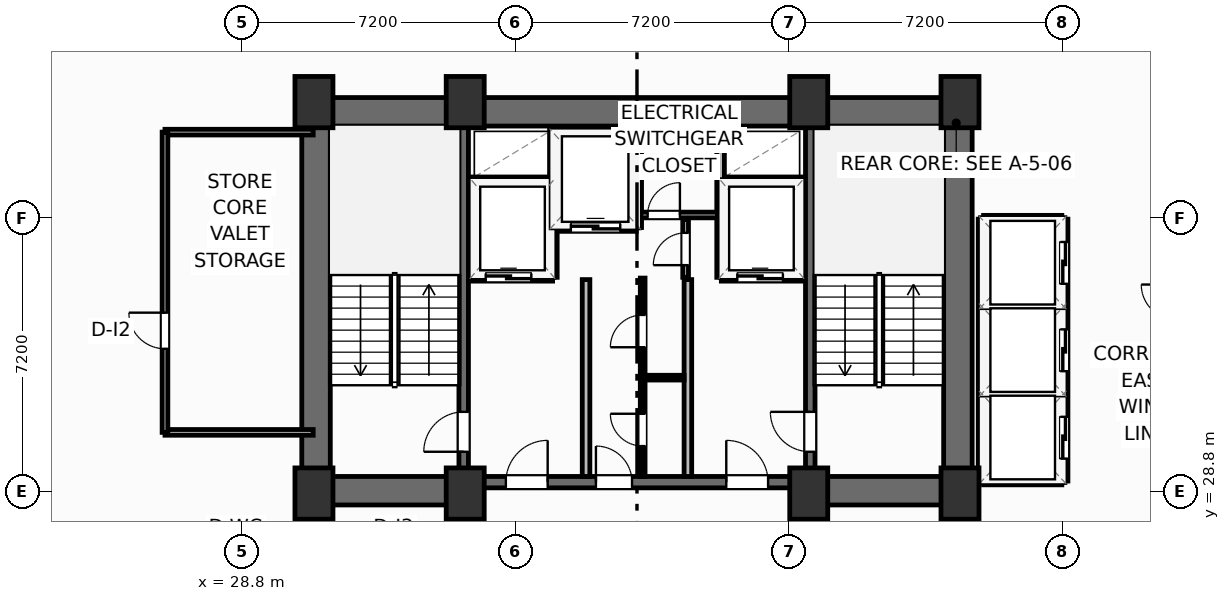
"""IFC4 building model, lengths in metres.
Left out: names, types, materials, properties, quantities, classifications, styles, units other than length and angle.
Written with IfcOpenShell. Run it as: python <this file> out.ifc"""

import sys

from ifc_helpers import new_model, si_unit, direction, frame, frame_2d, origin, origin_2d, place, context, subcontext, project, spatial, rectangle, extrude, element, fill, save


model = new_model("IFC4")
c1 = context("Model", 3, precision=1e-05, world=origin(), true_north=direction((0.0, 1.0)))
c2 = subcontext(c1, "Body", "Model", "MODEL_VIEW")
j1 = project(units=[si_unit("LENGTHUNIT", "METRE"), si_unit("PLANEANGLEUNIT", "RADIAN")], contexts=[c1])
p1 = place(None, origin())
s1 = spatial("IfcSite", under=j1, at=p1, CompositionType="ELEMENT")
p2 = place(p1, origin())
s2 = spatial("IfcBuilding", under=s1, at=p2, CompositionType="ELEMENT")
p3 = place(p2, frame((0.0, 0.0, 121.7)))
s3 = spatial("IfcBuildingStorey", under=s2, at=p3, CompositionType="ELEMENT", Elevation=121.7)
for number, where, z_axis, x_axis in (
    (1, (30.7, 28.75, 0.0), (0.0, 0.0, 1.0), (1.0, 0.0, 0.0)),
    (2, (34.68, 28.75, 0.0), (0.0, 0.0, 1.0), (1.0, 0.0, 0.0)),
    (3, (43.72, 28.75, 0.0), (0.0, 0.0, 1.0), (1.0, 0.0, 0.0)),
    (4, (47.7, 28.75, 0.0), (0.0, 0.0, 1.0), (1.0, 0.0, 0.0)),
    (5, (30.7, 39.05, 0.0), (0.0, 0.0, 1.0), (1.0, 0.0, 0.0)),
    (6, (34.68, 39.05, 0.0), (0.0, 0.0, 1.0), (1.0, 0.0, 0.0)),
    (7, (43.72, 39.05, 0.0), (0.0, 0.0, 1.0), (1.0, 0.0, 0.0)),
    (8, (47.7, 39.05, 0.0), (0.0, 0.0, 1.0), (1.0, 0.0, 0.0)),
):
    element("IfcColumn", number, at=place(p3, frame(where, z_axis=z_axis, x_axis=x_axis)), inside=s3, PredefinedType="COLUMN", context=c2, shape_type="SweptSolid", body=[
        extrude(rectangle(XDim=1.0, YDim=1.35, at=origin_2d()), origin(), (0.0, 0.0, 1.0), 3.7),
    ])
p4 = place(p3, frame((30.38, 38.795, 0.0), z_axis=(0.0, 0.0, 1.0), x_axis=(1.0, 0.0, 0.0)))
e9 = element("IfcWall", 9, at=p4, inside=s3, PredefinedType="SHEAR", context=c2, shape_type="SweptSolid", body=[
    extrude(rectangle(XDim=17.64, YDim=0.75, at=frame_2d((8.82, 0.0))), origin(), (0.0, 0.0, 1.0), 3.45),
])
for number, where, z_axis, x_axis in (
    (10, (30.755, 29.2, 0.0), (0.0, 0.0, 1.0), (0.0, 1.0, 0.0)),
    (11, (47.645, 29.2, 0.0), (0.0, 0.0, 1.0), (0.0, 1.0, 0.0)),
):
    element("IfcWall", number, at=place(p3, frame(where, z_axis=z_axis, x_axis=x_axis)), inside=s3, PredefinedType="SHEAR", context=c2, shape_type="SweptSolid", body=[
        extrude(rectangle(XDim=9.22, YDim=0.75, at=frame_2d((4.61, 0.0))), origin(), (0.0, 0.0, 1.0), 3.45),
    ])
p5 = place(p3, frame((30.38, 28.825, 0.0), z_axis=(0.0, 0.0, 1.0), x_axis=(1.0, 0.0, 0.0)))
e12 = element("IfcWall", 12, at=p5, inside=s3, PredefinedType="SHEAR", context=c2, shape_type="SweptSolid", body=[
    extrude(rectangle(XDim=4.42, YDim=0.75, at=frame_2d((2.21, 0.0))), origin(), (0.0, 0.0, 1.0), 3.45),
])
p6 = place(p3, frame((43.6, 28.825, 0.0), z_axis=(0.0, 0.0, 1.0), x_axis=(1.0, 0.0, 0.0)))
e13 = element("IfcWall", 13, at=p6, inside=s3, PredefinedType="SHEAR", context=c2, shape_type="SweptSolid", body=[
    extrude(rectangle(XDim=4.42, YDim=0.75, at=frame_2d((2.21, 0.0))), origin(), (0.0, 0.0, 1.0), 3.45),
])
p7 = place(p3, frame((34.8, 29.05, 0.0), z_axis=(0.0, 0.0, 1.0), x_axis=(1.0, 0.0, 0.0)))
e14 = element("IfcWall", 14, at=p7, inside=s3, PredefinedType="SHEAR", context=c2, shape_type="SweptSolid", body=[
    extrude(rectangle(XDim=8.8, YDim=0.3, at=frame_2d((4.4, 0.0))), origin(), (0.0, 0.0, 1.0), 3.45),
])
p8 = place(p7, frame((0.95, 0.0, 0.0)))
e15 = element("IfcOpeningElement", 15, at=p8, cuts=e14, PredefinedType="OPENING", context=c2, shape_type="SweptSolid", body=[
    extrude(rectangle(XDim=1.1, YDim=2.15, at=frame_2d((0.55, 1.075))), frame((0.0, 0.16, 0.0), z_axis=(0.0, -1.0, 0.0), x_axis=(1.0, 0.0, 0.0)), (0.0, 0.0, 1.0), 0.32),
])
p9 = place(p7, frame((6.75, 0.0, 0.0)))
e16 = element("IfcOpeningElement", 16, at=p9, cuts=e14, PredefinedType="OPENING", context=c2, shape_type="SweptSolid", body=[
    extrude(rectangle(XDim=1.1, YDim=2.15, at=frame_2d((0.55, 1.075))), frame((0.0, 0.16, 0.0), z_axis=(0.0, -1.0, 0.0), x_axis=(1.0, 0.0, 0.0)), (0.0, 0.0, 1.0), 0.32),
])
p10 = place(p7, frame((3.32, 0.0, 0.0)))
e17 = element("IfcOpeningElement", 17, at=p10, cuts=e14, PredefinedType="OPENING", context=c2, shape_type="SweptSolid", body=[
    extrude(rectangle(XDim=0.95, YDim=2.15, at=frame_2d((0.475, 1.075))), frame((0.0, 0.16, 0.0), z_axis=(0.0, -1.0, 0.0), x_axis=(1.0, 0.0, 0.0)), (0.0, 0.0, 1.0), 0.32),
])
p11 = place(p3, frame((34.64, 29.2, 0.0), z_axis=(0.0, 0.0, 1.0), x_axis=(0.0, 1.0, 0.0)))
e18 = element("IfcWall", 18, at=p11, inside=s3, PredefinedType="SHEAR", context=c2, shape_type="SweptSolid", body=[
    extrude(rectangle(XDim=9.22, YDim=0.25, at=frame_2d((4.61, 0.0))), origin(), (0.0, 0.0, 1.0), 3.45),
])
p12 = place(p11, frame((0.65, 0.0, 0.0)))
e19 = element("IfcOpeningElement", 19, at=p12, cuts=e18, PredefinedType="OPENING", context=c2, shape_type="SweptSolid", body=[
    extrude(rectangle(XDim=1.05, YDim=2.15, at=frame_2d((0.525, 1.075))), frame((0.0, 0.135, 0.0), z_axis=(0.0, -1.0, 0.0), x_axis=(1.0, 0.0, 0.0)), (0.0, 0.0, 1.0), 0.27),
])
p13 = place(p3, frame((43.76, 29.2, 0.0), z_axis=(0.0, 0.0, 1.0), x_axis=(0.0, 1.0, 0.0)))
e20 = element("IfcWall", 20, at=p13, inside=s3, PredefinedType="SHEAR", context=c2, shape_type="SweptSolid", body=[
    extrude(rectangle(XDim=9.22, YDim=0.25, at=frame_2d((4.61, 0.0))), origin(), (0.0, 0.0, 1.0), 3.45),
])
p14 = place(p13, frame((0.65, 0.0, 0.0)))
e21 = element("IfcOpeningElement", 21, at=p14, cuts=e20, PredefinedType="OPENING", context=c2, shape_type="SweptSolid", body=[
    extrude(rectangle(XDim=1.05, YDim=2.15, at=frame_2d((0.525, 1.075))), frame((0.0, 0.135, 0.0), z_axis=(0.0, -1.0, 0.0), x_axis=(1.0, 0.0, 0.0)), (0.0, 0.0, 1.0), 0.27),
])
for number, where, z_axis, x_axis in (
    (22, (37.86, 29.2, 0.0), (0.0, 0.0, 1.0), (0.0, 1.0, 0.0)),
    (23, (40.54, 29.2, 0.0), (0.0, 0.0, 1.0), (0.0, 1.0, 0.0)),
):
    element("IfcWall", number, at=place(p3, frame(where, z_axis=z_axis, x_axis=x_axis)), inside=s3, PredefinedType="PARTITIONING", context=c2, shape_type="SweptSolid", body=[
        extrude(rectangle(XDim=5.18, YDim=0.2, at=frame_2d((2.59, 0.0))), origin(), (0.0, 0.0, 1.0), 3.45),
    ])
p15 = place(p3, frame((34.8, 34.44, 0.0), z_axis=(0.0, 0.0, 1.0), x_axis=(1.0, 0.0, 0.0)))
e24 = element("IfcWall", 24, at=p15, inside=s3, PredefinedType="PARTITIONING", context=c2, shape_type="SweptSolid", body=[
    extrude(rectangle(XDim=2.18, YDim=0.2, at=frame_2d((1.09, 0.0))), origin(), (0.0, 0.0, 1.0), 3.45),
])
p16 = place(p15, frame((0.42, 0.0, 0.0)))
e25 = element("IfcOpeningElement", 25, at=p16, cuts=e24, PredefinedType="OPENING", context=c2, shape_type="SweptSolid", body=[
    extrude(rectangle(XDim=1.2, YDim=2.2, at=frame_2d((0.6, 1.1))), frame((0.0, 0.11, 0.0), z_axis=(0.0, -1.0, 0.0), x_axis=(1.0, 0.0, 0.0)), (0.0, 0.0, 1.0), 0.22),
])
p17 = place(p3, frame((34.8, 36.98, 0.0), z_axis=(0.0, 0.0, 1.0), x_axis=(1.0, 0.0, 0.0)))
e26 = element("IfcWall", 26, at=p17, inside=s3, PredefinedType="PARTITIONING", context=c2, shape_type="SweptSolid", body=[
    extrude(rectangle(XDim=2.18, YDim=0.2, at=frame_2d((1.09, 0.0))), origin(), (0.0, 0.0, 1.0), 3.45),
])
p18 = place(p3, frame((37.0, 34.44, 0.0), z_axis=(0.0, 0.0, 1.0), x_axis=(0.0, 1.0, 0.0)))
e27 = element("IfcWall", 27, at=p18, inside=s3, PredefinedType="PARTITIONING", context=c2, shape_type="SweptSolid", body=[
    extrude(rectangle(XDim=3.9, YDim=0.2, at=frame_2d((1.95, 0.0))), origin(), (0.0, 0.0, 1.0), 3.45),
])
p19 = place(p3, frame((41.42, 34.44, 0.0), z_axis=(0.0, 0.0, 1.0), x_axis=(1.0, 0.0, 0.0)))
e28 = element("IfcWall", 28, at=p19, inside=s3, PredefinedType="PARTITIONING", context=c2, shape_type="SweptSolid", body=[
    extrude(rectangle(XDim=2.18, YDim=0.2, at=frame_2d((1.09, 0.0))), origin(), (0.0, 0.0, 1.0), 3.45),
])
p20 = place(p19, frame((0.42, 0.0, 0.0)))
e29 = element("IfcOpeningElement", 29, at=p20, cuts=e28, PredefinedType="OPENING", context=c2, shape_type="SweptSolid", body=[
    extrude(rectangle(XDim=1.2, YDim=2.2, at=frame_2d((0.6, 1.1))), frame((0.0, 0.11, 0.0), z_axis=(0.0, -1.0, 0.0), x_axis=(1.0, 0.0, 0.0)), (0.0, 0.0, 1.0), 0.22),
])
p21 = place(p3, frame((41.42, 36.98, 0.0), z_axis=(0.0, 0.0, 1.0), x_axis=(1.0, 0.0, 0.0)))
e30 = element("IfcWall", 30, at=p21, inside=s3, PredefinedType="PARTITIONING", context=c2, shape_type="SweptSolid", body=[
    extrude(rectangle(XDim=2.18, YDim=0.2, at=frame_2d((1.09, 0.0))), origin(), (0.0, 0.0, 1.0), 3.45),
])
p22 = place(p3, frame((41.4, 34.44, 0.0), z_axis=(0.0, 0.0, 1.0), x_axis=(0.0, 1.0, 0.0)))
e31 = element("IfcWall", 31, at=p22, inside=s3, PredefinedType="PARTITIONING", context=c2, shape_type="SweptSolid", body=[
    extrude(rectangle(XDim=3.9, YDim=0.2, at=frame_2d((1.95, 0.0))), origin(), (0.0, 0.0, 1.0), 3.45),
])
p23 = place(p3, frame((37.06, 35.75, 0.0), z_axis=(0.0, 0.0, 1.0), x_axis=(1.0, 0.0, 0.0)))
e32 = element("IfcWall", 32, at=p23, inside=s3, PredefinedType="PARTITIONING", context=c2, shape_type="SweptSolid", body=[
    extrude(rectangle(XDim=2.12, YDim=0.2, at=frame_2d((1.06, 0.0))), origin(), (0.0, 0.0, 1.0), 3.45),
])
p24 = place(p23, frame((0.4, 0.0, 0.0)))
e33 = element("IfcOpeningElement", 33, at=p24, cuts=e32, PredefinedType="OPENING", context=c2, shape_type="SweptSolid", body=[
    extrude(rectangle(XDim=1.3, YDim=2.2, at=frame_2d((0.65, 1.1))), frame((0.0, 0.11, 0.0), z_axis=(0.0, -1.0, 0.0), x_axis=(1.0, 0.0, 0.0)), (0.0, 0.0, 1.0), 0.22),
])
p25 = place(p3, frame((39.22, 35.75, 0.0), z_axis=(0.0, 0.0, 1.0), x_axis=(0.0, 1.0, 0.0)))
e34 = element("IfcWall", 34, at=p25, inside=s3, PredefinedType="PARTITIONING", context=c2, shape_type="SweptSolid", body=[
    extrude(rectangle(XDim=2.59, YDim=0.2, at=frame_2d((1.295, 0.0))), origin(), (0.0, 0.0, 1.0), 3.45),
])
p26 = place(p3, frame((39.3, 36.08, 0.0), z_axis=(0.0, 0.0, 1.0), x_axis=(1.0, 0.0, 0.0)))
e35 = element("IfcWall", 35, at=p26, inside=s3, PredefinedType="PARTITIONING", context=c2, shape_type="SweptSolid", body=[
    extrude(rectangle(XDim=2.02, YDim=0.15, at=frame_2d((1.01, 0.0))), origin(), (0.0, 0.0, 1.0), 3.45),
])
p27 = place(p26, frame((0.18, 0.0, 0.0)))
e36 = element("IfcOpeningElement", 36, at=p27, cuts=e35, PredefinedType="OPENING", context=c2, shape_type="SweptSolid", body=[
    extrude(rectangle(XDim=0.85, YDim=2.05, at=frame_2d((0.425, 1.025))), frame((0.0, 0.085, 0.0), z_axis=(0.0, -1.0, 0.0), x_axis=(1.0, 0.0, 0.0)), (0.0, 0.0, 1.0), 0.17),
])
p28 = place(p3, frame((40.48, 34.44, 0.0), z_axis=(0.0, 0.0, 1.0), x_axis=(0.0, 1.0, 0.0)))
e37 = element("IfcWall", 37, at=p28, inside=s3, PredefinedType="PARTITIONING", context=c2, shape_type="SweptSolid", body=[
    extrude(rectangle(XDim=1.52, YDim=0.15, at=frame_2d((0.76, 0.0))), origin(), (0.0, 0.0, 1.0), 3.45),
])
p29 = place(p28, frame((0.32, 0.0, 0.0)))
e38 = element("IfcOpeningElement", 38, at=p29, cuts=e37, PredefinedType="OPENING", context=c2, shape_type="SweptSolid", body=[
    extrude(rectangle(XDim=0.85, YDim=2.05, at=frame_2d((0.425, 1.025))), frame((0.0, 0.085, 0.0), z_axis=(0.0, -1.0, 0.0), x_axis=(1.0, 0.0, 0.0)), (0.0, 0.0, 1.0), 0.17),
])
p30 = place(p3, frame((39.35, 31.8, 0.0), z_axis=(0.0, 0.0, 1.0), x_axis=(1.0, 0.0, 0.0)))
e39 = element("IfcWall", 39, at=p30, inside=s3, PredefinedType="PARTITIONING", context=c2, shape_type="SweptSolid", body=[
    extrude(rectangle(XDim=1.09, YDim=0.125, at=frame_2d((0.545, 0.0))), origin(), (0.0, 0.0, 1.0), 3.45),
])
p31 = place(p3, frame((39.35, 29.2, 0.0), z_axis=(0.0, 0.0, 1.0), x_axis=(0.0, 1.0, 0.0)))
e40 = element("IfcWall", 40, at=p31, inside=s3, PredefinedType="PARTITIONING", context=c2, shape_type="SweptSolid", body=[
    extrude(rectangle(XDim=5.22, YDim=0.125, at=frame_2d((2.61, 0.0))), origin(), (0.0, 0.0, 1.0), 3.45),
])
p32 = place(p31, frame((0.8, 0.0, 0.0)))
e41 = element("IfcOpeningElement", 41, at=p32, cuts=e40, PredefinedType="OPENING", context=c2, shape_type="SweptSolid", body=[
    extrude(rectangle(XDim=0.85, YDim=2.05, at=frame_2d((0.425, 1.025))), frame((0.0, 0.073, 0.0), z_axis=(0.0, -1.0, 0.0), x_axis=(1.0, 0.0, 0.0)), (0.0, 0.0, 1.0), 0.145),
])
p33 = place(p31, frame((3.4, 0.0, 0.0)))
e42 = element("IfcOpeningElement", 42, at=p33, cuts=e40, PredefinedType="OPENING", context=c2, shape_type="SweptSolid", body=[
    extrude(rectangle(XDim=0.85, YDim=2.05, at=frame_2d((0.425, 1.025))), frame((0.0, 0.073, 0.0), z_axis=(0.0, -1.0, 0.0), x_axis=(1.0, 0.0, 0.0)), (0.0, 0.0, 1.0), 0.145),
])
for number, where, z_axis, x_axis in (
    (43, (26.78, 30.36, 0.0), (0.0, 0.0, 1.0), (1.0, 0.0, 0.0)),
    (44, (26.78, 38.26, 0.0), (0.0, 0.0, 1.0), (1.0, 0.0, 0.0)),
):
    element("IfcWall", number, at=place(p3, frame(where, z_axis=z_axis, x_axis=x_axis)), inside=s3, PredefinedType="PARTITIONING", context=c2, shape_type="SweptSolid", body=[
        extrude(rectangle(XDim=3.9, YDim=0.15, at=frame_2d((1.95, 0.0))), origin(), (0.0, 0.0, 1.0), 3.45),
    ])
p34 = place(p3, frame((26.78, 30.36, 0.0), z_axis=(0.0, 0.0, 1.0), x_axis=(0.0, 1.0, 0.0)))
e45 = element("IfcWall", 45, at=p34, inside=s3, PredefinedType="PARTITIONING", context=c2, shape_type="SweptSolid", body=[
    extrude(rectangle(XDim=7.9, YDim=0.15, at=frame_2d((3.95, 0.0))), origin(), (0.0, 0.0, 1.0), 3.45),
])
p35 = place(p34, frame((2.2, 0.0, 0.0)))
e46 = element("IfcOpeningElement", 46, at=p35, cuts=e45, PredefinedType="OPENING", context=c2, shape_type="SweptSolid", body=[
    extrude(rectangle(XDim=0.95, YDim=2.05, at=frame_2d((0.475, 1.025))), frame((0.0, 0.085, 0.0), z_axis=(0.0, -1.0, 0.0), x_axis=(1.0, 0.0, 0.0)), (0.0, 0.0, 1.0), 0.17),
])
for number, where, z_axis, x_axis in (
    (47, (48.32, 31.375, 0.0), (0.0, 0.0, 1.0), (1.0, 0.0, 0.0)),
    (48, (48.32, 33.675, 0.0), (0.0, 0.0, 1.0), (1.0, 0.0, 0.0)),
):
    element("IfcWall", number, at=place(p3, frame(where, z_axis=z_axis, x_axis=x_axis)), inside=s3, PredefinedType="PARTITIONING", context=c2, shape_type="SweptSolid", body=[
        extrude(rectangle(XDim=2.06, YDim=0.2, at=frame_2d((1.03, 0.0))), origin(), (0.0, 0.0, 1.0), 3.45),
    ])
p36 = place(p3, frame((48.32, 29.08, 0.0), z_axis=(0.0, 0.0, 1.0), x_axis=(1.0, 0.0, 0.0)))
e49 = element("IfcWall", 49, at=p36, inside=s3, PredefinedType="PARTITIONING", context=c2, shape_type="SweptSolid", body=[
    extrude(rectangle(XDim=2.06, YDim=0.2, at=frame_2d((1.03, 0.0))), origin(), (0.0, 0.0, 1.0), 2.662),
])
p37 = place(p3, frame((48.32, 35.97, 0.0), z_axis=(0.0, 0.0, 1.0), x_axis=(1.0, 0.0, 0.0)))
e50 = element("IfcWall", 50, at=p37, inside=s3, PredefinedType="PARTITIONING", context=c2, shape_type="SweptSolid", body=[
    extrude(rectangle(XDim=2.06, YDim=0.2, at=frame_2d((1.03, 0.0))), origin(), (0.0, 0.0, 1.0), 3.45),
])
p38 = place(p3, frame((48.28, 29.08, 0.0), z_axis=(0.0, 0.0, 1.0), x_axis=(0.0, 1.0, 0.0)))
e51 = element("IfcWall", 51, at=p38, inside=s3, PredefinedType="PARTITIONING", context=c2, shape_type="SweptSolid", body=[
    extrude(rectangle(XDim=6.89, YDim=0.2, at=frame_2d((3.445, 0.0))), origin(), (0.0, 0.0, 1.0), 3.45),
])
p39 = place(p3, frame((50.44, 29.08, 0.0), z_axis=(0.0, 0.0, 1.0), x_axis=(0.0, 1.0, 0.0)))
e52 = element("IfcWall", 52, at=p39, inside=s3, PredefinedType="PARTITIONING", context=c2, shape_type="SweptSolid", body=[
    extrude(rectangle(XDim=6.89, YDim=0.2, at=frame_2d((3.445, 0.0))), origin(), (0.0, 0.0, 1.0), 3.45),
])
p40 = place(p39, frame((0.59, 0.0, 0.0)))
e53 = element("IfcOpeningElement", 53, at=p40, cuts=e52, PredefinedType="OPENING", context=c2, shape_type="SweptSolid", body=[
    extrude(rectangle(XDim=1.1, YDim=2.15, at=frame_2d((0.55, 1.075))), frame((0.0, 0.11, 0.0), z_axis=(0.0, -1.0, 0.0), x_axis=(1.0, 0.0, 0.0)), (0.0, 0.0, 1.0), 0.22),
])
p41 = place(p39, frame((2.89, 0.0, 0.0)))
e54 = element("IfcOpeningElement", 54, at=p41, cuts=e52, PredefinedType="OPENING", context=c2, shape_type="SweptSolid", body=[
    extrude(rectangle(XDim=1.1, YDim=2.15, at=frame_2d((0.55, 1.075))), frame((0.0, 0.11, 0.0), z_axis=(0.0, -1.0, 0.0), x_axis=(1.0, 0.0, 0.0)), (0.0, 0.0, 1.0), 0.22),
])
p42 = place(p39, frame((5.19, 0.0, 0.0)))
e55 = element("IfcOpeningElement", 55, at=p42, cuts=e52, PredefinedType="OPENING", context=c2, shape_type="SweptSolid", body=[
    extrude(rectangle(XDim=1.1, YDim=2.15, at=frame_2d((0.55, 1.075))), frame((0.0, 0.11, 0.0), z_axis=(0.0, -1.0, 0.0), x_axis=(1.0, 0.0, 0.0)), (0.0, 0.0, 1.0), 0.22),
])
p43 = place(p12, origin())
e56 = element("IfcDoor", 56, at=p43, inside=s3, OperationType="SINGLE_SWING_LEFT", PredefinedType="DOOR", context=c2, shape_type="SweptSolid", body=[
    extrude(rectangle(XDim=1.05, YDim=2.15, at=frame_2d((0.525, 1.075))), frame((0.0, 0.025, 0.0), z_axis=(0.0, -1.0, 0.0), x_axis=(1.0, 0.0, 0.0)), (0.0, 0.0, 1.0), 0.05),
])
fill(e19, e56)
p44 = place(p14, origin())
e57 = element("IfcDoor", 57, at=p44, inside=s3, OperationType="SINGLE_SWING_RIGHT", PredefinedType="DOOR", context=c2, shape_type="SweptSolid", body=[
    extrude(rectangle(XDim=1.05, YDim=2.15, at=frame_2d((0.525, 1.075))), frame((0.0, 0.025, 0.0), z_axis=(0.0, -1.0, 0.0), x_axis=(1.0, 0.0, 0.0)), (0.0, 0.0, 1.0), 0.05),
])
fill(e21, e57)
p45 = place(p8, origin())
e58 = element("IfcDoor", 58, at=p45, inside=s3, OperationType="SINGLE_SWING_RIGHT", PredefinedType="DOOR", context=c2, shape_type="SweptSolid", body=[
    extrude(rectangle(XDim=1.1, YDim=2.15, at=frame_2d((0.55, 1.075))), frame((0.0, 0.025, 0.0), z_axis=(0.0, -1.0, 0.0), x_axis=(1.0, 0.0, 0.0)), (0.0, 0.0, 1.0), 0.05),
])
fill(e15, e58)
p46 = place(p9, origin())
e59 = element("IfcDoor", 59, at=p46, inside=s3, OperationType="SINGLE_SWING_LEFT", PredefinedType="DOOR", context=c2, shape_type="SweptSolid", body=[
    extrude(rectangle(XDim=1.1, YDim=2.15, at=frame_2d((0.55, 1.075))), frame((0.0, 0.025, 0.0), z_axis=(0.0, -1.0, 0.0), x_axis=(1.0, 0.0, 0.0)), (0.0, 0.0, 1.0), 0.05),
])
fill(e16, e59)
p47 = place(p16, origin())
e60 = element("IfcDoor", 60, at=p47, inside=s3, OperationType="SLIDING_TO_LEFT", PredefinedType="DOOR", context=c2, shape_type="SweptSolid", body=[
    extrude(rectangle(XDim=1.2, YDim=2.2, at=frame_2d((0.6, 1.1))), frame((0.0, 0.025, 0.0), z_axis=(0.0, -1.0, 0.0), x_axis=(1.0, 0.0, 0.0)), (0.0, 0.0, 1.0), 0.05),
])
fill(e25, e60)
p48 = place(p20, origin())
e61 = element("IfcDoor", 61, at=p48, inside=s3, OperationType="SLIDING_TO_LEFT", PredefinedType="DOOR", context=c2, shape_type="SweptSolid", body=[
    extrude(rectangle(XDim=1.2, YDim=2.2, at=frame_2d((0.6, 1.1))), frame((0.0, 0.025, 0.0), z_axis=(0.0, -1.0, 0.0), x_axis=(1.0, 0.0, 0.0)), (0.0, 0.0, 1.0), 0.05),
])
fill(e29, e61)
p49 = place(p24, origin())
e62 = element("IfcDoor", 62, at=p49, inside=s3, OperationType="SLIDING_TO_LEFT", PredefinedType="DOOR", context=c2, shape_type="SweptSolid", body=[
    extrude(rectangle(XDim=1.3, YDim=2.2, at=frame_2d((0.65, 1.1))), frame((0.0, 0.025, 0.0), z_axis=(0.0, -1.0, 0.0), x_axis=(1.0, 0.0, 0.0)), (0.0, 0.0, 1.0), 0.05),
])
fill(e33, e62)
p50 = place(p27, origin())
e63 = element("IfcDoor", 63, at=p50, inside=s3, OperationType="SINGLE_SWING_RIGHT", PredefinedType="DOOR", context=c2, shape_type="SweptSolid", body=[
    extrude(rectangle(XDim=0.85, YDim=2.05, at=frame_2d((0.425, 1.025))), frame((0.0, 0.025, 0.0), z_axis=(0.0, -1.0, 0.0), x_axis=(1.0, 0.0, 0.0)), (0.0, 0.0, 1.0), 0.05),
])
fill(e36, e63)
p51 = place(p29, origin())
e64 = element("IfcDoor", 64, at=p51, inside=s3, OperationType="SINGLE_SWING_LEFT", PredefinedType="DOOR", context=c2, shape_type="SweptSolid", body=[
    extrude(rectangle(XDim=0.85, YDim=2.05, at=frame_2d((0.425, 1.025))), frame((0.0, 0.025, 0.0), z_axis=(0.0, -1.0, 0.0), x_axis=(1.0, 0.0, 0.0)), (0.0, 0.0, 1.0), 0.05),
])
fill(e38, e64)
p52 = place(p32, origin())
e65 = element("IfcDoor", 65, at=p52, inside=s3, OperationType="SINGLE_SWING_RIGHT", PredefinedType="DOOR", context=c2, shape_type="SweptSolid", body=[
    extrude(rectangle(XDim=0.85, YDim=2.05, at=frame_2d((0.425, 1.025))), frame((0.0, 0.025, 0.0), z_axis=(0.0, -1.0, 0.0), x_axis=(1.0, 0.0, 0.0)), (0.0, 0.0, 1.0), 0.05),
])
fill(e41, e65)
p53 = place(p33, origin())
e66 = element("IfcDoor", 66, at=p53, inside=s3, OperationType="SINGLE_SWING_LEFT", PredefinedType="DOOR", context=c2, shape_type="SweptSolid", body=[
    extrude(rectangle(XDim=0.85, YDim=2.05, at=frame_2d((0.425, 1.025))), frame((0.0, 0.025, 0.0), z_axis=(0.0, -1.0, 0.0), x_axis=(1.0, 0.0, 0.0)), (0.0, 0.0, 1.0), 0.05),
])
fill(e42, e66)
p54 = place(p10, origin())
e67 = element("IfcDoor", 67, at=p54, inside=s3, OperationType="SINGLE_SWING_LEFT", PredefinedType="DOOR", context=c2, shape_type="SweptSolid", body=[
    extrude(rectangle(XDim=0.95, YDim=2.15, at=frame_2d((0.475, 1.075))), frame((0.0, 0.025, 0.0), z_axis=(0.0, -1.0, 0.0), x_axis=(1.0, 0.0, 0.0)), (0.0, 0.0, 1.0), 0.05),
])
fill(e17, e67)
p55 = place(p35, origin())
e68 = element("IfcDoor", 68, at=p55, inside=s3, OperationType="SINGLE_SWING_RIGHT", PredefinedType="DOOR", context=c2, shape_type="SweptSolid", body=[
    extrude(rectangle(XDim=0.95, YDim=2.05, at=frame_2d((0.475, 1.025))), frame((0.0, 0.025, 0.0), z_axis=(0.0, -1.0, 0.0), x_axis=(1.0, 0.0, 0.0)), (0.0, 0.0, 1.0), 0.05),
])
fill(e46, e68)
p56 = place(p40, origin())
e69 = element("IfcDoor", 69, at=p56, inside=s3, OperationType="SLIDING_TO_LEFT", PredefinedType="DOOR", context=c2, shape_type="SweptSolid", body=[
    extrude(rectangle(XDim=1.1, YDim=2.15, at=frame_2d((0.55, 1.075))), frame((0.0, 0.025, 0.0), z_axis=(0.0, -1.0, 0.0), x_axis=(1.0, 0.0, 0.0)), (0.0, 0.0, 1.0), 0.05),
])
fill(e53, e69)
p57 = place(p41, origin())
e70 = element("IfcDoor", 70, at=p57, inside=s3, OperationType="SLIDING_TO_LEFT", PredefinedType="DOOR", context=c2, shape_type="SweptSolid", body=[
    extrude(rectangle(XDim=1.1, YDim=2.15, at=frame_2d((0.55, 1.075))), frame((0.0, 0.025, 0.0), z_axis=(0.0, -1.0, 0.0), x_axis=(1.0, 0.0, 0.0)), (0.0, 0.0, 1.0), 0.05),
])
fill(e54, e70)
p58 = place(p42, origin())
e71 = element("IfcDoor", 71, at=p58, inside=s3, OperationType="SLIDING_TO_LEFT", PredefinedType="DOOR", context=c2, shape_type="SweptSolid", body=[
    extrude(rectangle(XDim=1.1, YDim=2.15, at=frame_2d((0.55, 1.075))), frame((0.0, 0.025, 0.0), z_axis=(0.0, -1.0, 0.0), x_axis=(1.0, 0.0, 0.0)), (0.0, 0.0, 1.0), 0.05),
])
fill(e55, e71)
save(model, sys.argv[1])
